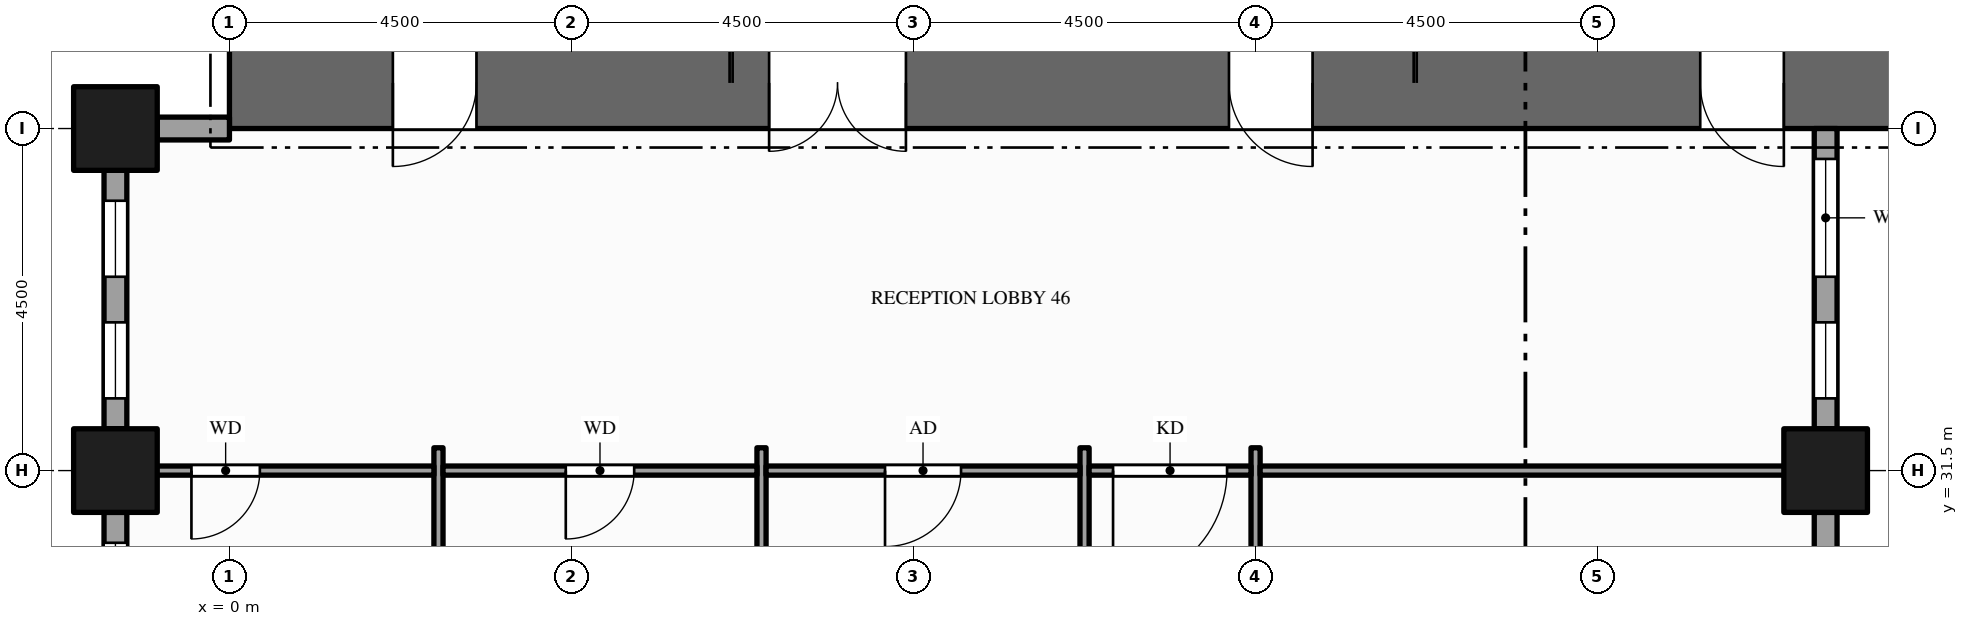
"""IFC4 building model, lengths in metres.
Left out: names, types, materials, properties, quantities, classifications, styles, units other than length and angle.
Written with IfcOpenShell. Run it as: python <this file> out.ifc"""

import sys

from ifc_helpers import new_model, si_unit, direction, frame, frame_2d, origin, origin_2d, place, context, subcontext, project, spatial, rectangle, hollow_rectangle, extrude, element, fill, save


model = new_model("IFC4")
c1 = context("Model", 3, precision=1e-05, world=origin(), true_north=direction((0.0, 1.0)))
c2 = subcontext(c1, "Body", "Model", "MODEL_VIEW")
j1 = project(units=[si_unit("LENGTHUNIT", "METRE"), si_unit("PLANEANGLEUNIT", "RADIAN")], contexts=[c1])
p1 = place(None, origin())
s1 = spatial("IfcSite", under=j1, at=p1, CompositionType="ELEMENT")
p2 = place(p1, origin())
s2 = spatial("IfcBuilding", under=s1, at=p2, CompositionType="ELEMENT")
p3 = place(p2, frame((0.0, 0.0, 57.0)))
s3 = spatial("IfcBuildingStorey", under=s2, at=p3, CompositionType="ELEMENT", Elevation=57.0)
p4 = place(p3, frame((0.0, 36.6, -0.15), z_axis=(0.0, 0.0, 1.0), x_axis=(1.0, 0.0, 0.0)))
e1 = element("IfcWall", 1, at=p4, inside=s3, PredefinedType="SHEAR", context=c2, shape_type="SweptSolid", body=[
    extrude(rectangle(XDim=22.5, YDim=1.2, at=frame_2d((11.25, 0.0))), origin(), (0.0, 0.0, 1.0), 4.0),
])
p5 = place(p4, frame((7.1, 0.0, 0.15)))
e2 = element("IfcOpeningElement", 2, at=p5, cuts=e1, PredefinedType="OPENING", context=c2, shape_type="SweptSolid", body=[
    extrude(rectangle(XDim=1.8, YDim=2.1, at=frame_2d((0.9, 1.05))), frame((0.0, 0.61, 0.0), z_axis=(0.0, -1.0, 0.0), x_axis=(1.0, 0.0, 0.0)), (0.0, 0.0, 1.0), 1.22),
])
p6 = place(p4, frame((13.15, 0.0, 0.15)))
e3 = element("IfcOpeningElement", 3, at=p6, cuts=e1, PredefinedType="OPENING", context=c2, shape_type="SweptSolid", body=[
    extrude(rectangle(XDim=1.1, YDim=2.1, at=frame_2d((0.55, 1.05))), frame((0.0, 0.61, 0.0), z_axis=(0.0, -1.0, 0.0), x_axis=(1.0, 0.0, 0.0)), (0.0, 0.0, 1.0), 1.22),
])
p7 = place(p4, frame((2.15, 0.0, 0.15)))
e4 = element("IfcOpeningElement", 4, at=p7, cuts=e1, PredefinedType="OPENING", context=c2, shape_type="SweptSolid", body=[
    extrude(rectangle(XDim=1.1, YDim=2.1, at=frame_2d((0.55, 1.05))), frame((0.0, 0.61, 0.0), z_axis=(0.0, -1.0, 0.0), x_axis=(1.0, 0.0, 0.0)), (0.0, 0.0, 1.0), 1.22),
])
p8 = place(p4, frame((19.35, 0.0, 0.15)))
e5 = element("IfcOpeningElement", 5, at=p8, cuts=e1, PredefinedType="OPENING", context=c2, shape_type="SweptSolid", body=[
    extrude(rectangle(XDim=1.1, YDim=2.1, at=frame_2d((0.55, 1.05))), frame((0.0, 0.61, 0.0), z_axis=(0.0, -1.0, 0.0), x_axis=(1.0, 0.0, 0.0)), (0.0, 0.0, 1.0), 1.22),
])
for number, where, z_axis, x_axis in (
    (6, (-1.5, 31.5, -0.15), (0.0, 0.0, 1.0), (1.0, 0.0, 0.0)),
    (7, (-1.5, 36.0, -0.15), (0.0, 0.0, 1.0), (1.0, 0.0, 0.0)),
    (8, (21.0, 31.5, -0.15), (0.0, 0.0, 1.0), (1.0, 0.0, 0.0)),
):
    element("IfcColumn", number, at=place(p3, frame(where, z_axis=z_axis, x_axis=x_axis)), inside=s3, PredefinedType="COLUMN", context=c2, shape_type="SweptSolid", body=[
        extrude(hollow_rectangle(XDim=1.1, YDim=1.1, WallThickness=0.06, at=origin_2d()), origin(), (0.0, 0.0, 1.0), 4.0),
    ])
p9 = place(p3, frame((21.0, 29.05, 0.0), z_axis=(0.0, 0.0, 1.0), x_axis=(0.0, 1.0, 0.0)))
e9 = element("IfcWall", 9, at=p9, inside=s3, PredefinedType="STANDARD", context=c2, shape_type="SweptSolid", body=[
    extrude(rectangle(XDim=1.9, YDim=0.3, at=frame_2d((0.95, 0.0))), origin(), (0.0, 0.0, 1.0), 3.144),
])
p10 = place(p3, frame((21.0, 32.05, 0.0), z_axis=(0.0, 0.0, 1.0), x_axis=(0.0, 1.0, 0.0)))
e10 = element("IfcWall", 10, at=p10, inside=s3, PredefinedType="STANDARD", context=c2, shape_type="SweptSolid", body=[
    extrude(rectangle(XDim=3.95, YDim=0.3, at=frame_2d((1.975, 0.0))), origin(), (0.0, 0.0, 1.0), 3.144),
])
p11 = place(p10, frame((0.4, 0.0, 0.9)))
e11 = element("IfcOpeningElement", 11, at=p11, cuts=e10, PredefinedType="OPENING", context=c2, shape_type="SweptSolid", body=[
    extrude(rectangle(XDim=1.0, YDim=2.0, at=frame_2d((0.5, 1.0))), frame((0.0, 0.16, 0.0), z_axis=(0.0, -1.0, 0.0), x_axis=(1.0, 0.0, 0.0)), (0.0, 0.0, 1.0), 0.32),
])
p12 = place(p10, frame((2.0, 0.0, 0.9)))
e12 = element("IfcOpeningElement", 12, at=p12, cuts=e10, PredefinedType="OPENING", context=c2, shape_type="SweptSolid", body=[
    extrude(rectangle(XDim=1.55, YDim=2.0, at=frame_2d((0.775, 1.0))), frame((0.0, 0.16, 0.0), z_axis=(0.0, -1.0, 0.0), x_axis=(1.0, 0.0, 0.0)), (0.0, 0.0, 1.0), 0.32),
])
p13 = place(p3, frame((0.0, 36.0, 0.0), z_axis=(0.0, 0.0, 1.0), x_axis=(-1.0, 0.0, 0.0)))
e13 = element("IfcWall", 13, at=p13, inside=s3, PredefinedType="STANDARD", context=c2, shape_type="SweptSolid", body=[
    extrude(rectangle(XDim=0.95, YDim=0.3, at=frame_2d((0.475, 0.0))), origin(), (0.0, 0.0, 1.0), 2.938),
])
p14 = place(p3, frame((-1.5, 35.45, 0.0), z_axis=(0.0, 0.0, 1.0), x_axis=(0.0, -1.0, 0.0)))
e14 = element("IfcWall", 14, at=p14, inside=s3, PredefinedType="STANDARD", context=c2, shape_type="SweptSolid", body=[
    extrude(rectangle(XDim=3.4, YDim=0.3, at=frame_2d((1.7, 0.0))), origin(), (0.0, 0.0, 1.0), 3.144),
])
p15 = place(p14, frame((0.4, 0.0, 0.9)))
e15 = element("IfcOpeningElement", 15, at=p15, cuts=e14, PredefinedType="OPENING", context=c2, shape_type="SweptSolid", body=[
    extrude(rectangle(XDim=1.0, YDim=2.0, at=frame_2d((0.5, 1.0))), frame((0.0, 0.16, 0.0), z_axis=(0.0, -1.0, 0.0), x_axis=(1.0, 0.0, 0.0)), (0.0, 0.0, 1.0), 0.32),
])
p16 = place(p14, frame((2.0, 0.0, 0.9)))
e16 = element("IfcOpeningElement", 16, at=p16, cuts=e14, PredefinedType="OPENING", context=c2, shape_type="SweptSolid", body=[
    extrude(rectangle(XDim=1.0, YDim=2.0, at=frame_2d((0.5, 1.0))), frame((0.0, 0.16, 0.0), z_axis=(0.0, -1.0, 0.0), x_axis=(1.0, 0.0, 0.0)), (0.0, 0.0, 1.0), 0.32),
])
p17 = place(p3, frame((-1.5, 30.95, 0.0), z_axis=(0.0, 0.0, 1.0), x_axis=(0.0, -1.0, 0.0)))
e17 = element("IfcWall", 17, at=p17, inside=s3, PredefinedType="STANDARD", context=c2, shape_type="SweptSolid", body=[
    extrude(rectangle(XDim=3.4, YDim=0.3, at=frame_2d((1.7, 0.0))), origin(), (0.0, 0.0, 1.0), 3.144),
])
p18 = place(p17, frame((0.4, 0.0, 0.9)))
e18 = element("IfcOpeningElement", 18, at=p18, cuts=e17, PredefinedType="OPENING", context=c2, shape_type="SweptSolid", body=[
    extrude(rectangle(XDim=1.0, YDim=2.0, at=frame_2d((0.5, 1.0))), frame((0.0, 0.16, 0.0), z_axis=(0.0, -1.0, 0.0), x_axis=(1.0, 0.0, 0.0)), (0.0, 0.0, 1.0), 0.32),
])
p19 = place(p17, frame((2.0, 0.0, 0.9)))
e19 = element("IfcOpeningElement", 19, at=p19, cuts=e17, PredefinedType="OPENING", context=c2, shape_type="SweptSolid", body=[
    extrude(rectangle(XDim=1.0, YDim=2.0, at=frame_2d((0.5, 1.0))), frame((0.0, 0.16, 0.0), z_axis=(0.0, -1.0, 0.0), x_axis=(1.0, 0.0, 0.0)), (0.0, 0.0, 1.0), 0.32),
])
for number, where, z_axis, x_axis in (
    (20, (2.75, 26.7, 0.0), (0.0, 0.0, 1.0), (0.0, 1.0, 0.0)),
    (21, (7.0, 26.7, 0.0), (0.0, 0.0, 1.0), (0.0, 1.0, 0.0)),
):
    element("IfcWall", number, at=place(p3, frame(where, z_axis=z_axis, x_axis=x_axis)), inside=s3, PredefinedType="PARTITIONING", context=c2, shape_type="SweptSolid", body=[
        extrude(rectangle(XDim=5.1, YDim=0.12, at=frame_2d((2.55, 0.0))), origin(), (0.0, 0.0, 1.0), 3.85),
    ])
p20 = place(p3, frame((11.25, 8.7, 0.0), z_axis=(0.0, 0.0, 1.0), x_axis=(0.0, 1.0, 0.0)))
e22 = element("IfcWall", 22, at=p20, inside=s3, PredefinedType="PARTITIONING", context=c2, shape_type="SweptSolid", body=[
    extrude(rectangle(XDim=23.1, YDim=0.12, at=frame_2d((11.55, 0.0))), origin(), (0.0, 0.0, 1.0), 2.6),
])
p21 = place(p20, frame((2.05, 0.0, 0.0)))
e23 = element("IfcOpeningElement", 23, at=p21, cuts=e22, PredefinedType="OPENING", context=c2, shape_type="SweptSolid", body=[
    extrude(rectangle(XDim=1.0, YDim=2.1, at=frame_2d((0.5, 1.05))), frame((0.0, 0.07, 0.0), z_axis=(0.0, -1.0, 0.0), x_axis=(1.0, 0.0, 0.0)), (0.0, 0.0, 1.0), 0.14),
])
p22 = place(p20, frame((7.675, 0.0, 0.0)))
e24 = element("IfcOpeningElement", 24, at=p22, cuts=e22, PredefinedType="OPENING", context=c2, shape_type="SweptSolid", body=[
    extrude(rectangle(XDim=1.0, YDim=2.1, at=frame_2d((0.5, 1.05))), frame((0.0, 0.07, 0.0), z_axis=(0.0, -1.0, 0.0), x_axis=(1.0, 0.0, 0.0)), (0.0, 0.0, 1.0), 0.14),
])
p23 = place(p20, frame((14.055, 0.0, 0.0)))
e25 = element("IfcOpeningElement", 25, at=p23, cuts=e22, PredefinedType="OPENING", context=c2, shape_type="SweptSolid", body=[
    extrude(rectangle(XDim=1.8, YDim=2.1, at=frame_2d((0.9, 1.05))), frame((0.0, 0.07, 0.0), z_axis=(0.0, -1.0, 0.0), x_axis=(1.0, 0.0, 0.0)), (0.0, 0.0, 1.0), 0.14),
])
p24 = place(p3, frame((13.5, 8.7, 0.0), z_axis=(0.0, 0.0, 1.0), x_axis=(0.0, 1.0, 0.0)))
e26 = element("IfcWall", 26, at=p24, inside=s3, PredefinedType="PARTITIONING", context=c2, shape_type="SweptSolid", body=[
    extrude(rectangle(XDim=23.1, YDim=0.12, at=frame_2d((11.55, 0.0))), origin(), (0.0, 0.0, 1.0), 2.6),
])
p25 = place(p24, frame((20.05, 0.0, 0.0)))
e27 = element("IfcOpeningElement", 27, at=p25, cuts=e26, PredefinedType="OPENING", context=c2, shape_type="SweptSolid", body=[
    extrude(rectangle(XDim=1.0, YDim=2.1, at=frame_2d((0.5, 1.05))), frame((0.0, 0.07, 0.0), z_axis=(0.0, -1.0, 0.0), x_axis=(1.0, 0.0, 0.0)), (0.0, 0.0, 1.0), 0.14),
])
p26 = place(p24, frame((4.2, 0.0, 0.0)))
e28 = element("IfcOpeningElement", 28, at=p26, cuts=e26, PredefinedType="OPENING", context=c2, shape_type="SweptSolid", body=[
    extrude(rectangle(XDim=1.2, YDim=2.1, at=frame_2d((0.6, 1.05))), frame((0.0, 0.07, 0.0), z_axis=(0.0, -1.0, 0.0), x_axis=(1.0, 0.0, 0.0)), (0.0, 0.0, 1.0), 0.14),
])
p27 = place(p3, frame((-1.35, 31.5, 0.0), z_axis=(0.0, 0.0, 1.0), x_axis=(1.0, 0.0, 0.0)))
e29 = element("IfcWall", 29, at=p27, inside=s3, PredefinedType="PARTITIONING", context=c2, shape_type="SweptSolid", body=[
    extrude(rectangle(XDim=4.04, YDim=0.12, at=frame_2d((2.02, 0.0))), origin(), (0.0, 0.0, 1.0), 2.938),
])
p28 = place(p27, frame((0.85, 0.0, 0.0)))
e30 = element("IfcOpeningElement", 30, at=p28, cuts=e29, PredefinedType="OPENING", context=c2, shape_type="SweptSolid", body=[
    extrude(rectangle(XDim=0.9, YDim=2.1, at=frame_2d((0.45, 1.05))), frame((0.0, 0.07, 0.0), z_axis=(0.0, -1.0, 0.0), x_axis=(1.0, 0.0, 0.0)), (0.0, 0.0, 1.0), 0.14),
])
p29 = place(p3, frame((2.81, 31.5, 0.0), z_axis=(0.0, 0.0, 1.0), x_axis=(1.0, 0.0, 0.0)))
e31 = element("IfcWall", 31, at=p29, inside=s3, PredefinedType="PARTITIONING", context=c2, shape_type="SweptSolid", body=[
    extrude(rectangle(XDim=4.13, YDim=0.12, at=frame_2d((2.065, 0.0))), origin(), (0.0, 0.0, 1.0), 2.938),
])
p30 = place(p29, frame((1.615, 0.0, 0.0)))
e32 = element("IfcOpeningElement", 32, at=p30, cuts=e31, PredefinedType="OPENING", context=c2, shape_type="SweptSolid", body=[
    extrude(rectangle(XDim=0.9, YDim=2.1, at=frame_2d((0.45, 1.05))), frame((0.0, 0.07, 0.0), z_axis=(0.0, -1.0, 0.0), x_axis=(1.0, 0.0, 0.0)), (0.0, 0.0, 1.0), 0.14),
])
p31 = place(p3, frame((7.06, 31.5, 0.0), z_axis=(0.0, 0.0, 1.0), x_axis=(1.0, 0.0, 0.0)))
e33 = element("IfcWall", 33, at=p31, inside=s3, PredefinedType="PARTITIONING", context=c2, shape_type="SweptSolid", body=[
    extrude(rectangle(XDim=4.13, YDim=0.12, at=frame_2d((2.065, 0.0))), origin(), (0.0, 0.0, 1.0), 2.938),
])
p32 = place(p31, frame((1.565, 0.0, 0.0)))
e34 = element("IfcOpeningElement", 34, at=p32, cuts=e33, PredefinedType="OPENING", context=c2, shape_type="SweptSolid", body=[
    extrude(rectangle(XDim=1.0, YDim=2.1, at=frame_2d((0.5, 1.05))), frame((0.0, 0.07, 0.0), z_axis=(0.0, -1.0, 0.0), x_axis=(1.0, 0.0, 0.0)), (0.0, 0.0, 1.0), 0.14),
])
p33 = place(p3, frame((11.31, 31.5, 0.0), z_axis=(0.0, 0.0, 1.0), x_axis=(1.0, 0.0, 0.0)))
e35 = element("IfcWall", 35, at=p33, inside=s3, PredefinedType="PARTITIONING", context=c2, shape_type="SweptSolid", body=[
    extrude(rectangle(XDim=2.13, YDim=0.12, at=frame_2d((1.065, 0.0))), origin(), (0.0, 0.0, 1.0), 2.938),
])
p34 = place(p33, frame((0.315, 0.0, 0.0)))
e36 = element("IfcOpeningElement", 36, at=p34, cuts=e35, PredefinedType="OPENING", context=c2, shape_type="SweptSolid", body=[
    extrude(rectangle(XDim=1.5, YDim=2.1, at=frame_2d((0.75, 1.05))), frame((0.0, 0.07, 0.0), z_axis=(0.0, -1.0, 0.0), x_axis=(1.0, 0.0, 0.0)), (0.0, 0.0, 1.0), 0.14),
])
p35 = place(p3, frame((13.56, 31.5, 0.0), z_axis=(0.0, 0.0, 1.0), x_axis=(1.0, 0.0, 0.0)))
e37 = element("IfcWall", 37, at=p35, inside=s3, PredefinedType="PARTITIONING", context=c2, shape_type="SweptSolid", body=[
    extrude(rectangle(XDim=7.29, YDim=0.12, at=frame_2d((3.645, 0.0))), origin(), (0.0, 0.0, 1.0), 2.938),
])
p36 = place(p11, origin())
e38 = element("IfcWindow", 38, at=p36, inside=s3, PartitioningType="SINGLE_PANEL", PredefinedType="WINDOW", context=c2, shape_type="SweptSolid", body=[
    extrude(rectangle(XDim=1.0, YDim=2.0, at=frame_2d((0.5, 1.0))), frame((0.0, 0.03, 0.0), z_axis=(0.0, -1.0, 0.0), x_axis=(1.0, 0.0, 0.0)), (0.0, 0.0, 1.0), 0.06),
])
fill(e11, e38)
p37 = place(p12, origin())
e39 = element("IfcWindow", 39, at=p37, inside=s3, PartitioningType="SINGLE_PANEL", PredefinedType="WINDOW", context=c2, shape_type="SweptSolid", body=[
    extrude(rectangle(XDim=1.55, YDim=2.0, at=frame_2d((0.775, 1.0))), frame((0.0, 0.03, 0.0), z_axis=(0.0, -1.0, 0.0), x_axis=(1.0, 0.0, 0.0)), (0.0, 0.0, 1.0), 0.06),
])
fill(e12, e39)
p38 = place(p15, origin())
e40 = element("IfcWindow", 40, at=p38, inside=s3, PartitioningType="SINGLE_PANEL", PredefinedType="WINDOW", context=c2, shape_type="SweptSolid", body=[
    extrude(rectangle(XDim=1.0, YDim=2.0, at=frame_2d((0.5, 1.0))), frame((0.0, 0.03, 0.0), z_axis=(0.0, -1.0, 0.0), x_axis=(1.0, 0.0, 0.0)), (0.0, 0.0, 1.0), 0.06),
])
fill(e15, e40)
p39 = place(p16, origin())
e41 = element("IfcWindow", 41, at=p39, inside=s3, PartitioningType="SINGLE_PANEL", PredefinedType="WINDOW", context=c2, shape_type="SweptSolid", body=[
    extrude(rectangle(XDim=1.0, YDim=2.0, at=frame_2d((0.5, 1.0))), frame((0.0, 0.03, 0.0), z_axis=(0.0, -1.0, 0.0), x_axis=(1.0, 0.0, 0.0)), (0.0, 0.0, 1.0), 0.06),
])
fill(e16, e41)
p40 = place(p18, origin())
e42 = element("IfcWindow", 42, at=p40, inside=s3, PartitioningType="SINGLE_PANEL", PredefinedType="WINDOW", context=c2, shape_type="SweptSolid", body=[
    extrude(rectangle(XDim=1.0, YDim=2.0, at=frame_2d((0.5, 1.0))), frame((0.0, 0.03, 0.0), z_axis=(0.0, -1.0, 0.0), x_axis=(1.0, 0.0, 0.0)), (0.0, 0.0, 1.0), 0.06),
])
fill(e18, e42)
p41 = place(p5, origin())
e43 = element("IfcDoor", 43, at=p41, inside=s3, OperationType="DOUBLE_DOOR_SINGLE_SWING", PredefinedType="DOOR", context=c2, shape_type="SweptSolid", body=[
    extrude(rectangle(XDim=1.8, YDim=2.1, at=frame_2d((0.9, 1.05))), frame((0.0, 0.025, 0.0), z_axis=(0.0, -1.0, 0.0), x_axis=(1.0, 0.0, 0.0)), (0.0, 0.0, 1.0), 0.05),
])
fill(e2, e43)
p42 = place(p6, origin())
e44 = element("IfcDoor", 44, at=p42, inside=s3, OperationType="SINGLE_SWING_RIGHT", PredefinedType="DOOR", context=c2, shape_type="SweptSolid", body=[
    extrude(rectangle(XDim=1.1, YDim=2.1, at=frame_2d((0.55, 1.05))), frame((0.0, 0.025, 0.0), z_axis=(0.0, -1.0, 0.0), x_axis=(1.0, 0.0, 0.0)), (0.0, 0.0, 1.0), 0.05),
])
fill(e3, e44)
p43 = place(p7, origin())
e45 = element("IfcDoor", 45, at=p43, inside=s3, OperationType="SINGLE_SWING_LEFT", PredefinedType="DOOR", context=c2, shape_type="SweptSolid", body=[
    extrude(rectangle(XDim=1.1, YDim=2.1, at=frame_2d((0.55, 1.05))), frame((0.0, 0.025, 0.0), z_axis=(0.0, -1.0, 0.0), x_axis=(1.0, 0.0, 0.0)), (0.0, 0.0, 1.0), 0.05),
])
fill(e4, e45)
p44 = place(p8, origin())
e46 = element("IfcDoor", 46, at=p44, inside=s3, OperationType="SINGLE_SWING_RIGHT", PredefinedType="DOOR", context=c2, shape_type="SweptSolid", body=[
    extrude(rectangle(XDim=1.1, YDim=2.1, at=frame_2d((0.55, 1.05))), frame((0.0, 0.025, 0.0), z_axis=(0.0, -1.0, 0.0), x_axis=(1.0, 0.0, 0.0)), (0.0, 0.0, 1.0), 0.05),
])
fill(e5, e46)
p45 = place(p34, origin())
e47 = element("IfcDoor", 47, at=p45, inside=s3, OperationType="SINGLE_SWING_LEFT", PredefinedType="DOOR", context=c2, shape_type="SweptSolid", body=[
    extrude(rectangle(XDim=1.5, YDim=2.1, at=frame_2d((0.75, 1.05))), frame((0.0, 0.025, 0.0), z_axis=(0.0, -1.0, 0.0), x_axis=(1.0, 0.0, 0.0)), (0.0, 0.0, 1.0), 0.05),
])
fill(e36, e47)
p46 = place(p28, origin())
e48 = element("IfcDoor", 48, at=p46, inside=s3, OperationType="SINGLE_SWING_LEFT", PredefinedType="DOOR", context=c2, shape_type="SweptSolid", body=[
    extrude(rectangle(XDim=0.9, YDim=2.1, at=frame_2d((0.45, 1.05))), frame((0.0, 0.025, 0.0), z_axis=(0.0, -1.0, 0.0), x_axis=(1.0, 0.0, 0.0)), (0.0, 0.0, 1.0), 0.05),
])
fill(e30, e48)
p47 = place(p30, origin())
e49 = element("IfcDoor", 49, at=p47, inside=s3, OperationType="SINGLE_SWING_LEFT", PredefinedType="DOOR", context=c2, shape_type="SweptSolid", body=[
    extrude(rectangle(XDim=0.9, YDim=2.1, at=frame_2d((0.45, 1.05))), frame((0.0, 0.025, 0.0), z_axis=(0.0, -1.0, 0.0), x_axis=(1.0, 0.0, 0.0)), (0.0, 0.0, 1.0), 0.05),
])
fill(e32, e49)
p48 = place(p32, origin())
e50 = element("IfcDoor", 50, at=p48, inside=s3, OperationType="SINGLE_SWING_LEFT", PredefinedType="DOOR", context=c2, shape_type="SweptSolid", body=[
    extrude(rectangle(XDim=1.0, YDim=2.1, at=frame_2d((0.5, 1.05))), frame((0.0, 0.025, 0.0), z_axis=(0.0, -1.0, 0.0), x_axis=(1.0, 0.0, 0.0)), (0.0, 0.0, 1.0), 0.05),
])
fill(e34, e50)
save(model, sys.argv[1])
